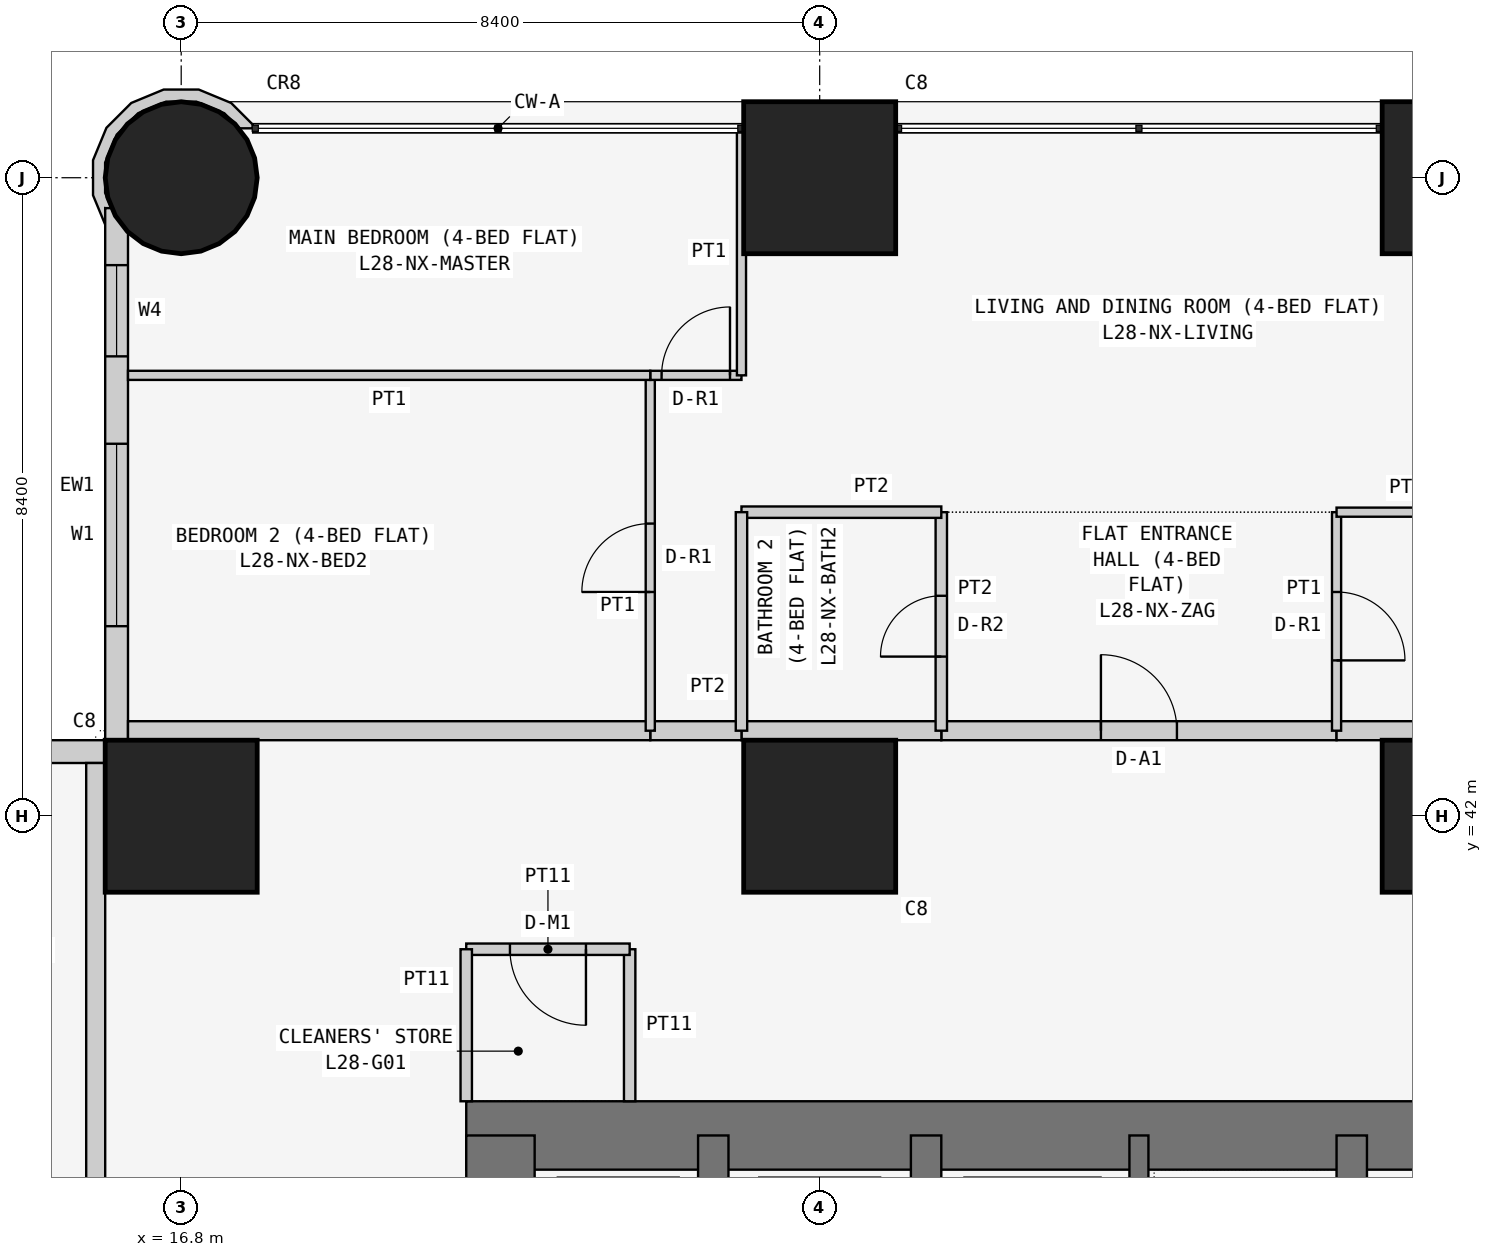
"""IFC4 building model, lengths in metres.
Left out: names, types, materials, properties, quantities, classifications, styles, units other than length and angle.
Written with IfcOpenShell. Run it as: python <this file> out.ifc"""

import sys

from ifc_helpers import new_model, si_unit, direction, frame, frame_2d, origin, origin_2d, place, context, subcontext, project, spatial, polyline, rectangle, circle, outline, extrude, element, fill, save


model = new_model("IFC4")
c1 = context("Model", 3, precision=1e-05, world=origin(), true_north=direction((0.0, 1.0)))
c2 = subcontext(c1, "Body", "Model", "MODEL_VIEW")
j1 = project(units=[si_unit("LENGTHUNIT", "METRE"), si_unit("PLANEANGLEUNIT", "RADIAN")], contexts=[c1])
p1 = place(None, origin())
s1 = spatial("IfcSite", under=j1, at=p1, CompositionType="ELEMENT")
p2 = place(p1, origin())
s2 = spatial("IfcBuilding", under=s1, at=p2, CompositionType="ELEMENT")
p3 = place(p2, frame((0.0, 0.0, 112.5)))
s3 = spatial("IfcBuildingStorey", under=s2, at=p3, CompositionType="ELEMENT", Elevation=112.5)
p4 = place(p3, frame((16.8, 42.0, 0.0), z_axis=(0.0, 0.0, 1.0), x_axis=(1.0, 0.0, 0.0)))
e1 = element("IfcColumn", 1, at=p4, inside=s3, PredefinedType="COLUMN", context=c2, shape_type="SweptSolid", body=[
    extrude(rectangle(XDim=2.0, YDim=2.0, at=origin_2d()), origin(), (0.0, 0.0, 1.0), 3.6),
])
p5 = place(p3, frame((16.8, 50.4, 0.0), z_axis=(0.0, 0.0, 1.0), x_axis=(1.0, 0.0, 0.0)))
e2 = element("IfcColumn", 2, at=p5, inside=s3, PredefinedType="COLUMN", context=c2, shape_type="SweptSolid", body=[
    extrude(circle(Radius=1.0, at=origin_2d()), origin(), (0.0, 0.0, 1.0), 3.6),
])
for number, where, z_axis, x_axis in (
    (3, (25.2, 42.0, 0.0), (0.0, 0.0, 1.0), (1.0, 0.0, 0.0)),
    (4, (25.2, 50.4, 0.0), (0.0, 0.0, 1.0), (1.0, 0.0, 0.0)),
    (5, (33.6, 42.0, 0.0), (0.0, 0.0, 1.0), (1.0, 0.0, 0.0)),
    (6, (33.6, 50.4, 0.0), (0.0, 0.0, 1.0), (1.0, 0.0, 0.0)),
):
    element("IfcColumn", number, at=place(p3, frame(where, z_axis=z_axis, x_axis=x_axis)), inside=s3, PredefinedType="COLUMN", context=c2, shape_type="SweptSolid", body=[
        extrude(rectangle(XDim=2.0, YDim=2.0, at=origin_2d()), origin(), (0.0, 0.0, 1.0), 3.6),
    ])
p6 = place(p3, frame((37.8, 37.8, 0.0), z_axis=(0.0, 0.0, 1.0), x_axis=(-1.0, 0.0, 0.0)))
e7 = element("IfcWall", 7, at=p6, inside=s3, PredefinedType="SHEAR", context=c2, shape_type="SweptSolid", body=[
    extrude(rectangle(XDim=17.25, YDim=0.9, at=frame_2d((8.625, 0.0))), origin(), (0.0, 0.0, 1.0), 3.6),
])
p7 = place(p3, frame((21.0, 37.8, 0.0), z_axis=(0.0, 0.0, 1.0), x_axis=(0.0, -1.0, 0.0)))
e8 = element("IfcWall", 8, at=p7, inside=s3, PredefinedType="SHEAR", context=c2, shape_type="SweptSolid", body=[
    extrude(rectangle(XDim=17.25, YDim=0.9, at=frame_2d((8.625, 0.0))), origin(), (0.0, 0.0, 1.0), 3.6),
])
p8 = place(p7, frame((5.4, 0.0, 0.0)))
e9 = element("IfcOpeningElement", 9, at=p8, cuts=e8, PredefinedType="OPENING", context=c2, shape_type="SweptSolid", body=[
    extrude(rectangle(XDim=1.2, YDim=2.1, at=frame_2d((0.6, 1.05))), frame((0.0, 0.46, 0.0), z_axis=(0.0, -1.0, 0.0), x_axis=(1.0, 0.0, 0.0)), (0.0, 0.0, 1.0), 0.92),
])
p9 = place(p3, frame((26.6, 21.0, 0.0), z_axis=(0.0, 0.0, 1.0), x_axis=(0.0, 1.0, 0.0)))
e10 = element("IfcWall", 10, at=p9, inside=s3, PredefinedType="SHEAR", context=c2, shape_type="SweptSolid", body=[
    extrude(rectangle(XDim=16.8, YDim=0.4, at=frame_2d((8.4, 0.0))), origin(), (0.0, 0.0, 1.0), 3.6),
])
p10 = place(p9, frame((10.4, 0.0, 0.0)))
e11 = element("IfcOpeningElement", 11, at=p10, cuts=e10, PredefinedType="OPENING", context=c2, shape_type="SweptSolid", body=[
    extrude(rectangle(XDim=1.2, YDim=2.1, at=frame_2d((0.6, 1.05))), frame((0.0, 0.21, 0.0), z_axis=(0.0, -1.0, 0.0), x_axis=(1.0, 0.0, 0.0)), (0.0, 0.0, 1.0), 0.42),
])
p11 = place(p3, frame((23.8, 34.6, 0.0), z_axis=(0.0, 0.0, 1.0), x_axis=(0.0, 1.0, 0.0)))
e12 = element("IfcWall", 12, at=p11, inside=s3, PredefinedType="SHEAR", context=c2, shape_type="SweptSolid", body=[
    extrude(rectangle(XDim=3.2, YDim=0.4, at=frame_2d((1.6, 0.0))), origin(), (0.0, 0.0, 1.0), 3.6),
])
p12 = place(p3, frame((32.2, 29.2, 0.0), z_axis=(0.0, 0.0, 1.0), x_axis=(0.0, 1.0, 0.0)))
e13 = element("IfcWall", 13, at=p12, inside=s3, PredefinedType="SHEAR", context=c2, shape_type="SweptSolid", body=[
    extrude(rectangle(XDim=8.6, YDim=0.4, at=frame_2d((4.3, 0.0))), origin(), (0.0, 0.0, 1.0), 3.6),
])
p13 = place(p3, frame((29.4, 34.6, 0.0), z_axis=(0.0, 0.0, 1.0), x_axis=(0.0, 1.0, 0.0)))
e14 = element("IfcWall", 14, at=p13, inside=s3, PredefinedType="SHEAR", context=c2, shape_type="SweptSolid", body=[
    extrude(rectangle(XDim=3.2, YDim=0.25, at=frame_2d((1.6, 0.0))), origin(), (0.0, 0.0, 1.0), 3.6),
])
p14 = place(p3, frame((15.8, 42.85, 0.0), z_axis=(0.0, 0.0, 1.0), x_axis=(-1.0, 0.0, 0.0)))
e15 = element("IfcWall", 15, at=p14, inside=s3, PredefinedType="SOLIDWALL", context=c2, shape_type="SweptSolid", body=[
    extrude(rectangle(XDim=15.4, YDim=0.3, at=frame_2d((7.7, 0.0))), origin(), (0.0, 0.0, 1.0), 3.45),
])
p15 = place(p14, frame((1.2, 0.0, 0.9)))
e16 = element("IfcOpeningElement", 16, at=p15, cuts=e15, PredefinedType="OPENING", context=c2, shape_type="SweptSolid", body=[
    extrude(rectangle(XDim=1.8, YDim=1.5, at=frame_2d((0.9, 0.75))), frame((0.0, 0.16, 0.0), z_axis=(0.0, -1.0, 0.0), x_axis=(1.0, 0.0, 0.0)), (0.0, 0.0, 1.0), 0.32),
])
p16 = place(p14, frame((4.95, 0.0, 1.5)))
e17 = element("IfcOpeningElement", 17, at=p16, cuts=e15, PredefinedType="OPENING", context=c2, shape_type="SweptSolid", body=[
    extrude(rectangle(XDim=0.9, YDim=0.7, at=frame_2d((0.45, 0.35))), frame((0.0, 0.16, 0.0), z_axis=(0.0, -1.0, 0.0), x_axis=(1.0, 0.0, 0.0)), (0.0, 0.0, 1.0), 0.32),
])
p17 = place(p14, frame((8.5, 0.0, 0.9)))
e18 = element("IfcOpeningElement", 18, at=p17, cuts=e15, PredefinedType="OPENING", context=c2, shape_type="SweptSolid", body=[
    extrude(rectangle(XDim=1.8, YDim=1.5, at=frame_2d((0.9, 0.75))), frame((0.0, 0.16, 0.0), z_axis=(0.0, -1.0, 0.0), x_axis=(1.0, 0.0, 0.0)), (0.0, 0.0, 1.0), 0.32),
])
p18 = place(p14, frame((12.5, 0.0, 0.0)))
e19 = element("IfcOpeningElement", 19, at=p18, cuts=e15, PredefinedType="OPENING", context=c2, shape_type="SweptSolid", body=[
    extrude(rectangle(XDim=0.9, YDim=2.4, at=frame_2d((0.45, 1.2))), frame((0.0, 0.16, 0.0), z_axis=(0.0, -1.0, 0.0), x_axis=(1.0, 0.0, 0.0)), (0.0, 0.0, 1.0), 0.32),
])
p19 = place(p14, frame((13.5, 0.0, 0.9)))
e20 = element("IfcOpeningElement", 20, at=p19, cuts=e15, PredefinedType="OPENING", context=c2, shape_type="SweptSolid", body=[
    extrude(rectangle(XDim=1.2, YDim=1.5, at=frame_2d((0.6, 0.75))), frame((0.0, 0.16, 0.0), z_axis=(0.0, -1.0, 0.0), x_axis=(1.0, 0.0, 0.0)), (0.0, 0.0, 1.0), 0.32),
])
p20 = place(p3, frame((15.95, 50.0, 0.0), z_axis=(0.0, 0.0, 1.0), x_axis=(0.0, -1.0, 0.0)))
e21 = element("IfcWall", 21, at=p20, inside=s3, PredefinedType="SOLIDWALL", context=c2, shape_type="SweptSolid", body=[
    extrude(rectangle(XDim=7.3, YDim=0.3, at=frame_2d((3.65, 0.0))), origin(), (0.0, 0.0, 1.0), 3.45),
])
p21 = place(p20, frame((3.1, 0.0, 0.9)))
e22 = element("IfcOpeningElement", 22, at=p21, cuts=e21, PredefinedType="OPENING", context=c2, shape_type="SweptSolid", body=[
    extrude(rectangle(XDim=2.4, YDim=1.5, at=frame_2d((1.2, 0.75))), frame((0.0, 0.16, 0.0), z_axis=(0.0, -1.0, 0.0), x_axis=(1.0, 0.0, 0.0)), (0.0, 0.0, 1.0), 0.32),
])
p22 = place(p20, frame((0.75, 0.0, 0.9)))
e23 = element("IfcOpeningElement", 23, at=p22, cuts=e21, PredefinedType="OPENING", context=c2, shape_type="SweptSolid", body=[
    extrude(rectangle(XDim=1.2, YDim=1.5, at=frame_2d((0.6, 0.75))), frame((0.0, 0.16, 0.0), z_axis=(0.0, -1.0, 0.0), x_axis=(1.0, 0.0, 0.0)), (0.0, 0.0, 1.0), 0.32),
])
p23 = place(p3, frame((17.668, 51.043, 0.0), z_axis=(0.0, 0.0, 1.0), x_axis=(-0.555974394895, 0.831199417842, 0.0)))
e24 = element("IfcWall", 24, at=p23, inside=s3, PredefinedType="SOLIDWALL", context=c2, shape_type="SweptSolid", body=[
    extrude(outline(polyline([(0.004, -0.092), (0.4, -0.014), (0.784, 0.242), (1.04, 0.625), (1.13, 1.078), (1.041, 1.531), (0.784, 1.915), (0.401, 2.171), (-0.009, 2.253), (0.171, 2.132), (0.113, 2.066), (0.339, 2.021), (0.67, 1.8), (0.891, 1.469), (0.968, 1.078), (0.89, 0.688), (0.669, 0.357), (0.338, 0.136), (0.062, 0.081), (-0.036, -0.066), (0.004, -0.092)])), origin(), (0.0, 0.0, 1.0), 3.45),
])
p24 = place(p3, frame((22.7, 38.25, 0.0), z_axis=(0.0, 0.0, 1.0), x_axis=(0.0, 1.0, 0.0)))
e25 = element("IfcWall", 25, at=p24, inside=s3, PredefinedType="PARTITIONING", context=c2, shape_type="SweptSolid", body=[
    extrude(rectangle(XDim=2.0, YDim=0.15, at=frame_2d((1.0, 0.0))), origin(), (0.0, 0.0, 1.0), 3.45),
])
p25 = place(p3, frame((22.7, 40.25, 0.0), z_axis=(0.0, 0.0, 1.0), x_axis=(-1.0, 0.0, 0.0)))
e26 = element("IfcWall", 26, at=p25, inside=s3, PredefinedType="PARTITIONING", context=c2, shape_type="SweptSolid", body=[
    extrude(rectangle(XDim=2.15, YDim=0.15, at=frame_2d((1.075, 0.0))), origin(), (0.0, 0.0, 1.0), 3.45),
])
p26 = place(p25, frame((0.575, 0.0, 0.0)))
e27 = element("IfcOpeningElement", 27, at=p26, cuts=e26, PredefinedType="OPENING", context=c2, shape_type="SweptSolid", body=[
    extrude(rectangle(XDim=1.0, YDim=2.1, at=frame_2d((0.5, 1.05))), frame((0.0, 0.085, 0.0), z_axis=(0.0, -1.0, 0.0), x_axis=(1.0, 0.0, 0.0)), (0.0, 0.0, 1.0), 0.17),
])
p27 = place(p3, frame((20.55, 40.25, 0.0), z_axis=(0.0, 0.0, 1.0), x_axis=(0.0, -1.0, 0.0)))
e28 = element("IfcWall", 28, at=p27, inside=s3, PredefinedType="PARTITIONING", context=c2, shape_type="SweptSolid", body=[
    extrude(rectangle(XDim=2.0, YDim=0.15, at=frame_2d((1.0, 0.0))), origin(), (0.0, 0.0, 1.0), 3.45),
])
p28 = place(p3, frame((26.8, 43.125, 0.0), z_axis=(0.0, 0.0, 1.0), x_axis=(1.0, 0.0, 0.0)))
e29 = element("IfcWall", 29, at=p28, inside=s3, PredefinedType="PARTITIONING", context=c2, shape_type="SweptSolid", body=[
    extrude(rectangle(XDim=5.2, YDim=0.25, at=frame_2d((2.6, 0.0))), origin(), (0.0, 0.0, 1.0), 3.45),
])
p29 = place(p28, frame((2.1, 0.0, 0.0)))
e30 = element("IfcOpeningElement", 30, at=p29, cuts=e29, PredefinedType="OPENING", context=c2, shape_type="SweptSolid", body=[
    extrude(rectangle(XDim=1.0, YDim=2.1, at=frame_2d((0.5, 1.05))), frame((0.0, 0.135, 0.0), z_axis=(0.0, -1.0, 0.0), x_axis=(1.0, 0.0, 0.0)), (0.0, 0.0, 1.0), 0.27),
])
p30 = place(p3, frame((24.171, 43.125, 0.0), z_axis=(0.0, 0.0, 1.0), x_axis=(1.0, 0.0, 0.0)))
e31 = element("IfcWall", 31, at=p30, inside=s3, PredefinedType="PARTITIONING", context=c2, shape_type="SweptSolid", body=[
    extrude(rectangle(XDim=2.629, YDim=0.25, at=frame_2d((1.314, 0.0))), origin(), (0.0, 0.0, 1.0), 3.45),
])
p31 = place(p3, frame((32.0, 43.125, 0.0), z_axis=(0.0, 0.0, 1.0), x_axis=(1.0, 0.0, 0.0)))
e32 = element("IfcWall", 32, at=p31, inside=s3, PredefinedType="PARTITIONING", context=c2, shape_type="SweptSolid", body=[
    extrude(rectangle(XDim=2.629, YDim=0.25, at=frame_2d((1.314, 0.0))), origin(), (0.0, 0.0, 1.0), 3.45),
])
p32 = place(p3, frame((22.971, 43.125, 0.0), z_axis=(0.0, 0.0, 1.0), x_axis=(1.0, 0.0, 0.0)))
e33 = element("IfcWall", 33, at=p32, inside=s3, PredefinedType="PARTITIONING", context=c2, shape_type="SweptSolid", body=[
    extrude(rectangle(XDim=1.2, YDim=0.25, at=frame_2d((0.6, 0.0))), origin(), (0.0, 0.0, 1.0), 3.45),
])
p33 = place(p3, frame((16.1, 43.125, 0.0), z_axis=(0.0, 0.0, 1.0), x_axis=(1.0, 0.0, 0.0)))
e34 = element("IfcWall", 34, at=p33, inside=s3, PredefinedType="PARTITIONING", context=c2, shape_type="SweptSolid", body=[
    extrude(rectangle(XDim=6.871, YDim=0.25, at=frame_2d((3.436, 0.0))), origin(), (0.0, 0.0, 1.0), 3.45),
])
p34 = place(p3, frame((15.675, 36.229, 0.0), z_axis=(0.0, 0.0, 1.0), x_axis=(0.0, 1.0, 0.0)))
e35 = element("IfcWall", 35, at=p34, inside=s3, PredefinedType="PARTITIONING", context=c2, shape_type="SweptSolid", body=[
    extrude(rectangle(XDim=6.471, YDim=0.25, at=frame_2d((3.235, 0.0))), origin(), (0.0, 0.0, 1.0), 3.45),
])
p35 = place(p3, frame((26.8, 46.0, 0.0), z_axis=(0.0, 0.0, 1.0), x_axis=(0.0, -1.0, 0.0)))
e36 = element("IfcWall", 36, at=p35, inside=s3, PredefinedType="PARTITIONING", context=c2, shape_type="SweptSolid", body=[
    extrude(rectangle(XDim=2.875, YDim=0.15, at=frame_2d((1.438, 0.0))), origin(), (0.0, 0.0, 1.0), 3.45),
])
p36 = place(p35, frame((1.1, 0.0, 0.0)))
e37 = element("IfcOpeningElement", 37, at=p36, cuts=e36, PredefinedType="OPENING", context=c2, shape_type="SweptSolid", body=[
    extrude(rectangle(XDim=0.8, YDim=2.1, at=frame_2d((0.4, 1.05))), frame((0.0, 0.085, 0.0), z_axis=(0.0, -1.0, 0.0), x_axis=(1.0, 0.0, 0.0)), (0.0, 0.0, 1.0), 0.17),
])
p37 = place(p3, frame((32.0, 43.125, 0.0), z_axis=(0.0, 0.0, 1.0), x_axis=(0.0, 1.0, 0.0)))
e38 = element("IfcWall", 38, at=p37, inside=s3, PredefinedType="PARTITIONING", context=c2, shape_type="SweptSolid", body=[
    extrude(rectangle(XDim=2.875, YDim=0.12, at=frame_2d((1.438, 0.0))), origin(), (0.0, 0.0, 1.0), 3.45),
])
p38 = place(p37, frame((0.925, 0.0, 0.0)))
e39 = element("IfcOpeningElement", 39, at=p38, cuts=e38, PredefinedType="OPENING", context=c2, shape_type="SweptSolid", body=[
    extrude(rectangle(XDim=0.9, YDim=2.1, at=frame_2d((0.45, 1.05))), frame((0.0, 0.07, 0.0), z_axis=(0.0, -1.0, 0.0), x_axis=(1.0, 0.0, 0.0)), (0.0, 0.0, 1.0), 0.14),
])
p39 = place(p3, frame((26.8, 46.0, 0.0), z_axis=(0.0, 0.0, 1.0), x_axis=(-1.0, 0.0, 0.0)))
e40 = element("IfcWall", 40, at=p39, inside=s3, PredefinedType="PARTITIONING", context=c2, shape_type="SweptSolid", body=[
    extrude(rectangle(XDim=2.629, YDim=0.15, at=frame_2d((1.314, 0.0))), origin(), (0.0, 0.0, 1.0), 3.45),
])
p40 = place(p3, frame((24.171, 46.0, 0.0), z_axis=(0.0, 0.0, 1.0), x_axis=(0.0, -1.0, 0.0)))
e41 = element("IfcWall", 41, at=p40, inside=s3, PredefinedType="PARTITIONING", context=c2, shape_type="SweptSolid", body=[
    extrude(rectangle(XDim=2.875, YDim=0.15, at=frame_2d((1.438, 0.0))), origin(), (0.0, 0.0, 1.0), 3.45),
])
p41 = place(p3, frame((34.629, 46.0, 0.0), z_axis=(0.0, 0.0, 1.0), x_axis=(-1.0, 0.0, 0.0)))
e42 = element("IfcWall", 42, at=p41, inside=s3, PredefinedType="PARTITIONING", context=c2, shape_type="SweptSolid", body=[
    extrude(rectangle(XDim=2.629, YDim=0.12, at=frame_2d((1.314, 0.0))), origin(), (0.0, 0.0, 1.0), 3.45),
])
p42 = place(p3, frame((22.971, 43.125, 0.0), z_axis=(0.0, 0.0, 1.0), x_axis=(0.0, 1.0, 0.0)))
e43 = element("IfcWall", 43, at=p42, inside=s3, PredefinedType="PARTITIONING", context=c2, shape_type="SweptSolid", body=[
    extrude(rectangle(XDim=4.675, YDim=0.12, at=frame_2d((2.337, 0.0))), origin(), (0.0, 0.0, 1.0), 3.45),
])
p43 = place(p42, frame((1.825, 0.0, 0.0)))
e44 = element("IfcOpeningElement", 44, at=p43, cuts=e43, PredefinedType="OPENING", context=c2, shape_type="SweptSolid", body=[
    extrude(rectangle(XDim=0.9, YDim=2.1, at=frame_2d((0.45, 1.05))), frame((0.0, 0.07, 0.0), z_axis=(0.0, -1.0, 0.0), x_axis=(1.0, 0.0, 0.0)), (0.0, 0.0, 1.0), 0.14),
])
p44 = place(p3, frame((22.971, 47.8, 0.0), z_axis=(0.0, 0.0, 1.0), x_axis=(1.0, 0.0, 0.0)))
e45 = element("IfcWall", 45, at=p44, inside=s3, PredefinedType="PARTITIONING", context=c2, shape_type="SweptSolid", body=[
    extrude(rectangle(XDim=1.2, YDim=0.12, at=frame_2d((0.6, 0.0))), origin(), (0.0, 0.0, 1.0), 3.45),
])
p45 = place(p44, frame((0.149, 0.0, 0.0)))
e46 = element("IfcOpeningElement", 46, at=p45, cuts=e45, PredefinedType="OPENING", context=c2, shape_type="SweptSolid", body=[
    extrude(rectangle(XDim=0.9, YDim=2.1, at=frame_2d((0.45, 1.05))), frame((0.0, 0.07, 0.0), z_axis=(0.0, -1.0, 0.0), x_axis=(1.0, 0.0, 0.0)), (0.0, 0.0, 1.0), 0.14),
])
p46 = place(p3, frame((24.171, 47.8, 0.0), z_axis=(0.0, 0.0, 1.0), x_axis=(0.0, 1.0, 0.0)))
e47 = element("IfcWall", 47, at=p46, inside=s3, PredefinedType="PARTITIONING", context=c2, shape_type="SweptSolid", body=[
    extrude(rectangle(XDim=3.25, YDim=0.12, at=frame_2d((1.625, 0.0))), origin(), (0.0, 0.0, 1.0), 3.45),
])
p47 = place(p3, frame((22.971, 47.8, 0.0), z_axis=(0.0, 0.0, 1.0), x_axis=(-1.0, 0.0, 0.0)))
e48 = element("IfcWall", 48, at=p47, inside=s3, PredefinedType="PARTITIONING", context=c2, shape_type="SweptSolid", body=[
    extrude(rectangle(XDim=6.871, YDim=0.12, at=frame_2d((3.436, 0.0))), origin(), (0.0, 0.0, 1.0), 3.45),
])
p48 = place(p21, origin())
e49 = element("IfcWindow", 49, at=p48, inside=s3, PartitioningType="SINGLE_PANEL", PredefinedType="WINDOW", context=c2, shape_type="SweptSolid", body=[
    extrude(rectangle(XDim=2.4, YDim=1.5, at=frame_2d((1.2, 0.75))), frame((0.0, 0.03, 0.0), z_axis=(0.0, -1.0, 0.0), x_axis=(1.0, 0.0, 0.0)), (0.0, 0.0, 1.0), 0.06),
])
fill(e22, e49)
p49 = place(p22, origin())
e50 = element("IfcWindow", 50, at=p49, inside=s3, PartitioningType="SINGLE_PANEL", PredefinedType="WINDOW", context=c2, shape_type="SweptSolid", body=[
    extrude(rectangle(XDim=1.2, YDim=1.5, at=frame_2d((0.6, 0.75))), frame((0.0, 0.03, 0.0), z_axis=(0.0, -1.0, 0.0), x_axis=(1.0, 0.0, 0.0)), (0.0, 0.0, 1.0), 0.06),
])
fill(e23, e50)
p50 = place(p26, origin())
e51 = element("IfcDoor", 51, at=p50, inside=s3, OperationType="SINGLE_SWING_LEFT", PredefinedType="DOOR", context=c2, shape_type="SweptSolid", body=[
    extrude(rectangle(XDim=1.0, YDim=2.1, at=frame_2d((0.5, 1.05))), frame((0.0, 0.025, 0.0), z_axis=(0.0, -1.0, 0.0), x_axis=(1.0, 0.0, 0.0)), (0.0, 0.0, 1.0), 0.05),
])
fill(e27, e51)
p51 = place(p29, origin())
e52 = element("IfcDoor", 52, at=p51, inside=s3, OperationType="SINGLE_SWING_LEFT", PredefinedType="DOOR", context=c2, shape_type="SweptSolid", body=[
    extrude(rectangle(XDim=1.0, YDim=2.1, at=frame_2d((0.5, 1.05))), frame((0.0, 0.025, 0.0), z_axis=(0.0, -1.0, 0.0), x_axis=(1.0, 0.0, 0.0)), (0.0, 0.0, 1.0), 0.05),
])
fill(e30, e52)
p52 = place(p36, frame((0.8, 0.0, 0.0), z_axis=(0.0, 0.0, 1.0), x_axis=(-1.0, 0.0, 0.0)))
e53 = element("IfcDoor", 53, at=p52, inside=s3, OperationType="SINGLE_SWING_LEFT", PredefinedType="DOOR", context=c2, shape_type="SweptSolid", body=[
    extrude(rectangle(XDim=0.8, YDim=2.1, at=frame_2d((0.4, 1.05))), frame((0.0, 0.025, 0.0), z_axis=(0.0, -1.0, 0.0), x_axis=(1.0, 0.0, 0.0)), (0.0, 0.0, 1.0), 0.05),
])
fill(e37, e53)
p53 = place(p38, frame((0.9, 0.0, 0.0), z_axis=(0.0, 0.0, 1.0), x_axis=(-1.0, 0.0, 0.0)))
e54 = element("IfcDoor", 54, at=p53, inside=s3, OperationType="SINGLE_SWING_RIGHT", PredefinedType="DOOR", context=c2, shape_type="SweptSolid", body=[
    extrude(rectangle(XDim=0.9, YDim=2.1, at=frame_2d((0.45, 1.05))), frame((0.0, 0.025, 0.0), z_axis=(0.0, -1.0, 0.0), x_axis=(1.0, 0.0, 0.0)), (0.0, 0.0, 1.0), 0.05),
])
fill(e39, e54)
p54 = place(p43, origin())
e55 = element("IfcDoor", 55, at=p54, inside=s3, OperationType="SINGLE_SWING_LEFT", PredefinedType="DOOR", context=c2, shape_type="SweptSolid", body=[
    extrude(rectangle(XDim=0.9, YDim=2.1, at=frame_2d((0.45, 1.05))), frame((0.0, 0.025, 0.0), z_axis=(0.0, -1.0, 0.0), x_axis=(1.0, 0.0, 0.0)), (0.0, 0.0, 1.0), 0.05),
])
fill(e44, e55)
p55 = place(p45, origin())
e56 = element("IfcDoor", 56, at=p55, inside=s3, OperationType="SINGLE_SWING_RIGHT", PredefinedType="DOOR", context=c2, shape_type="SweptSolid", body=[
    extrude(rectangle(XDim=0.9, YDim=2.1, at=frame_2d((0.45, 1.05))), frame((0.0, 0.025, 0.0), z_axis=(0.0, -1.0, 0.0), x_axis=(1.0, 0.0, 0.0)), (0.0, 0.0, 1.0), 0.05),
])
fill(e46, e56)
save(model, sys.argv[1])
